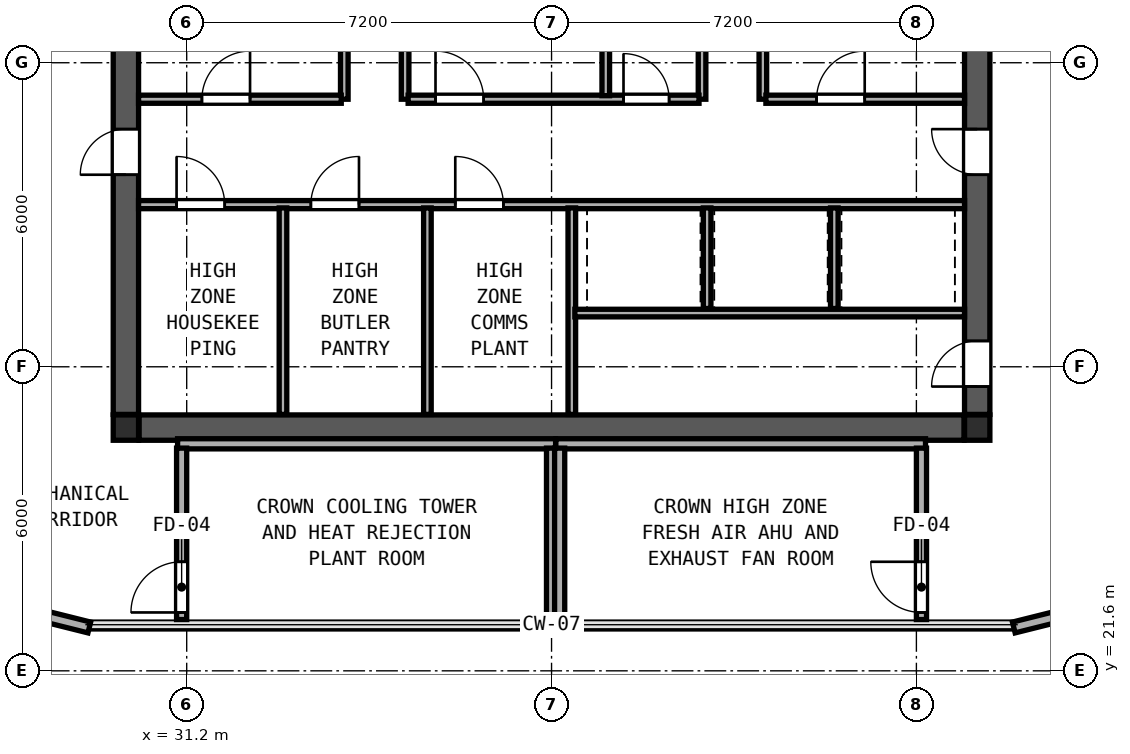
"""IFC4 building model, lengths in metres.
Left out: names, types, materials, properties, quantities, classifications, styles, units other than length and angle.
Written with IfcOpenShell. Run it as: python <this file> out.ifc"""

import sys

from ifc_helpers import new_model, si_unit, direction, frame, frame_2d, origin, origin_2d, place, context, subcontext, project, spatial, rectangle, hollow_rectangle, extrude, element, fill, save


model = new_model("IFC4")
c1 = context("Model", 3, precision=1e-05, world=origin(), true_north=direction((0.0, 1.0)))
c2 = subcontext(c1, "Body", "Model", "MODEL_VIEW")
j1 = project(units=[si_unit("LENGTHUNIT", "METRE"), si_unit("PLANEANGLEUNIT", "RADIAN")], contexts=[c1])
p1 = place(None, origin())
s1 = spatial("IfcSite", under=j1, at=p1, CompositionType="ELEMENT")
p2 = place(p1, origin())
s2 = spatial("IfcBuilding", under=s1, at=p2, CompositionType="ELEMENT")
p3 = place(p2, frame((0.0, 0.0, 328.2)))
s3 = spatial("IfcBuildingStorey", under=s2, at=p3, CompositionType="ELEMENT", Elevation=328.2)
p4 = place(p3, frame((30.26, 26.4, 0.0), z_axis=(0.0, 0.0, 1.0), x_axis=(1.0, 0.0, 0.0)))
e1 = element("IfcWall", 1, at=p4, inside=s3, PredefinedType="SHEAR", context=c2, shape_type="SweptSolid", body=[
    extrude(rectangle(XDim=16.28, YDim=0.5, at=frame_2d((8.14, 0.0))), origin(), (0.0, 0.0, 1.0), 4.55),
])
p5 = place(p3, frame((30.0, 26.66, 0.0), z_axis=(0.0, 0.0, 1.0), x_axis=(0.0, 1.0, 0.0)))
e2 = element("IfcWall", 2, at=p5, inside=s3, PredefinedType="SHEAR", context=c2, shape_type="SweptSolid", body=[
    extrude(rectangle(XDim=16.28, YDim=0.5, at=frame_2d((8.14, 0.0))), origin(), (0.0, 0.0, 1.0), 4.55),
])
p6 = place(p5, frame((4.73, 0.0, 0.0)))
e3 = element("IfcOpeningElement", 3, at=p6, cuts=e2, PredefinedType="OPENING", context=c2, shape_type="SweptSolid", body=[
    extrude(rectangle(XDim=0.9, YDim=2.1, at=frame_2d((0.45, 1.05))), frame((0.0, 0.26, 0.0), z_axis=(0.0, -1.0, 0.0), x_axis=(1.0, 0.0, 0.0)), (0.0, 0.0, 1.0), 0.52),
])
p7 = place(p3, frame((46.8, 26.66, 0.0), z_axis=(0.0, 0.0, 1.0), x_axis=(0.0, 1.0, 0.0)))
e4 = element("IfcWall", 4, at=p7, inside=s3, PredefinedType="SHEAR", context=c2, shape_type="SweptSolid", body=[
    extrude(rectangle(XDim=16.28, YDim=0.5, at=frame_2d((8.14, 0.0))), origin(), (0.0, 0.0, 1.0), 4.55),
])
p8 = place(p7, frame((5.63, 0.0, 0.0), z_axis=(0.0, 0.0, 1.0), x_axis=(-1.0, 0.0, 0.0)))
e5 = element("IfcOpeningElement", 5, at=p8, cuts=e4, PredefinedType="OPENING", context=c2, shape_type="SweptSolid", body=[
    extrude(rectangle(XDim=0.9, YDim=2.1, at=frame_2d((0.45, 1.05))), frame((0.0, 0.26, 0.0), z_axis=(0.0, -1.0, 0.0), x_axis=(1.0, 0.0, 0.0)), (0.0, 0.0, 1.0), 0.52),
])
p9 = place(p7, frame((1.45, 0.0, 0.0), z_axis=(0.0, 0.0, 1.0), x_axis=(-1.0, 0.0, 0.0)))
e6 = element("IfcOpeningElement", 6, at=p9, cuts=e4, PredefinedType="OPENING", context=c2, shape_type="SweptSolid", body=[
    extrude(rectangle(XDim=0.9, YDim=2.1, at=frame_2d((0.45, 1.05))), frame((0.0, 0.26, 0.0), z_axis=(0.0, -1.0, 0.0), x_axis=(1.0, 0.0, 0.0)), (0.0, 0.0, 1.0), 0.52),
])
for number, where, z_axis, x_axis in (
    (7, (30.0, 26.4, 0.0), (0.0, 0.0, 1.0), (1.0, 0.0, 0.0)),
    (8, (46.8, 26.4, 0.0), (0.0, 0.0, 1.0), (1.0, 0.0, 0.0)),
):
    element("IfcColumn", number, at=place(p3, frame(where, z_axis=z_axis, x_axis=x_axis)), inside=s3, PredefinedType="COLUMN", context=c2, shape_type="SweptSolid", body=[
        extrude(hollow_rectangle(XDim=0.5, YDim=0.5, WallThickness=0.02, at=origin_2d()), origin(), (0.0, 0.0, 1.0), 4.8),
    ])
p10 = place(p3, frame((26.057, 23.261, 0.0), z_axis=(0.0, 0.0, 1.0), x_axis=(0.970138175099, -0.242552924566, 0.0)))
e9 = element("IfcWall", 9, at=p10, inside=s3, PredefinedType="SOLIDWALL", context=c2, shape_type="SweptSolid", body=[
    extrude(rectangle(XDim=3.321, YDim=0.22, at=frame_2d((1.66, 0.0))), origin(), (0.0, 0.0, 1.0), 4.55),
])
p11 = place(p3, frame((47.522, 22.455, 0.0), z_axis=(0.0, 0.0, 1.0), x_axis=(0.970134270788, 0.242568540093, 0.0)))
e10 = element("IfcWall", 10, at=p11, inside=s3, PredefinedType="SOLIDWALL", context=c2, shape_type="SweptSolid", body=[
    extrude(rectangle(XDim=3.49, YDim=0.22, at=frame_2d((1.745, 0.0))), origin(), (0.0, 0.0, 1.0), 4.55),
])
for number, where, z_axis, x_axis in (
    (11, (34.31, 32.88, 0.0), (0.0, 0.0, 1.0), (0.0, 1.0, 0.0)),
    (12, (35.51, 32.88, 0.0), (0.0, 0.0, 1.0), (0.0, 1.0, 0.0)),
    (13, (41.37, 32.88, 0.0), (0.0, 0.0, 1.0), (0.0, 1.0, 0.0)),
    (14, (42.57, 32.88, 0.0), (0.0, 0.0, 1.0), (0.0, 1.0, 0.0)),
):
    element("IfcWall", number, at=place(p3, frame(where, z_axis=z_axis, x_axis=x_axis)), inside=s3, PredefinedType="SOLIDWALL", context=c2, shape_type="SweptSolid", body=[
        extrude(rectangle(XDim=2.17, YDim=0.15, at=frame_2d((1.085, 0.0))), origin(), (0.0, 0.0, 1.0), 4.55),
    ])
p12 = place(p3, frame((30.25, 32.88, 0.0), z_axis=(0.0, 0.0, 1.0), x_axis=(1.0, 0.0, 0.0)))
e15 = element("IfcWall", 15, at=p12, inside=s3, PredefinedType="SOLIDWALL", context=c2, shape_type="SweptSolid", body=[
    extrude(rectangle(XDim=4.0, YDim=0.16, at=frame_2d((2.0, 0.0))), origin(), (0.0, 0.0, 1.0), 4.55),
])
p13 = place(p12, frame((2.2, 0.0, 0.0), z_axis=(0.0, 0.0, 1.0), x_axis=(-1.0, 0.0, 0.0)))
e16 = element("IfcOpeningElement", 16, at=p13, cuts=e15, PredefinedType="OPENING", context=c2, shape_type="SweptSolid", body=[
    extrude(rectangle(XDim=0.95, YDim=2.12, at=frame_2d((0.475, 1.06))), frame((0.0, 0.09, 0.0), z_axis=(0.0, -1.0, 0.0), x_axis=(1.0, 0.0, 0.0)), (0.0, 0.0, 1.0), 0.18),
])
p14 = place(p3, frame((35.57, 32.88, 0.0), z_axis=(0.0, 0.0, 1.0), x_axis=(1.0, 0.0, 0.0)))
e17 = element("IfcWall", 17, at=p14, inside=s3, PredefinedType="SOLIDWALL", context=c2, shape_type="SweptSolid", body=[
    extrude(rectangle(XDim=5.74, YDim=0.16, at=frame_2d((2.87, 0.0))), origin(), (0.0, 0.0, 1.0), 4.55),
])
p15 = place(p14, frame((1.49, 0.0, 0.0), z_axis=(0.0, 0.0, 1.0), x_axis=(-1.0, 0.0, 0.0)))
e18 = element("IfcOpeningElement", 18, at=p15, cuts=e17, PredefinedType="OPENING", context=c2, shape_type="SweptSolid", body=[
    extrude(rectangle(XDim=0.95, YDim=2.12, at=frame_2d((0.475, 1.06))), frame((0.0, 0.09, 0.0), z_axis=(0.0, -1.0, 0.0), x_axis=(1.0, 0.0, 0.0)), (0.0, 0.0, 1.0), 0.18),
])
p16 = place(p14, frame((5.15, 0.0, 0.0), z_axis=(0.0, 0.0, 1.0), x_axis=(-1.0, 0.0, 0.0)))
e19 = element("IfcOpeningElement", 19, at=p16, cuts=e17, PredefinedType="OPENING", context=c2, shape_type="SweptSolid", body=[
    extrude(rectangle(XDim=0.9, YDim=2.1, at=frame_2d((0.45, 1.05))), frame((0.0, 0.09, 0.0), z_axis=(0.0, -1.0, 0.0), x_axis=(1.0, 0.0, 0.0)), (0.0, 0.0, 1.0), 0.18),
])
p17 = place(p3, frame((42.63, 32.88, 0.0), z_axis=(0.0, 0.0, 1.0), x_axis=(1.0, 0.0, 0.0)))
e20 = element("IfcWall", 20, at=p17, inside=s3, PredefinedType="SOLIDWALL", context=c2, shape_type="SweptSolid", body=[
    extrude(rectangle(XDim=3.92, YDim=0.16, at=frame_2d((1.96, 0.0))), origin(), (0.0, 0.0, 1.0), 4.55),
])
p18 = place(p17, frame((1.95, 0.0, 0.0), z_axis=(0.0, 0.0, 1.0), x_axis=(-1.0, 0.0, 0.0)))
e21 = element("IfcOpeningElement", 21, at=p18, cuts=e20, PredefinedType="OPENING", context=c2, shape_type="SweptSolid", body=[
    extrude(rectangle(XDim=0.95, YDim=2.12, at=frame_2d((0.475, 1.06))), frame((0.0, 0.09, 0.0), z_axis=(0.0, -1.0, 0.0), x_axis=(1.0, 0.0, 0.0)), (0.0, 0.0, 1.0), 0.18),
])
p19 = place(p3, frame((39.47, 32.95, 0.0), z_axis=(0.0, 0.0, 1.0), x_axis=(0.0, 1.0, 0.0)))
e22 = element("IfcWall", 22, at=p19, inside=s3, PredefinedType="SOLIDWALL", context=c2, shape_type="SweptSolid", body=[
    extrude(rectangle(XDim=2.05, YDim=0.15, at=frame_2d((1.025, 0.0))), origin(), (0.0, 0.0, 1.0), 4.55),
])
p20 = place(p3, frame((30.25, 30.8, 0.0), z_axis=(0.0, 0.0, 1.0), x_axis=(1.0, 0.0, 0.0)))
e23 = element("IfcWall", 23, at=p20, inside=s3, PredefinedType="SOLIDWALL", context=c2, shape_type="SweptSolid", body=[
    extrude(rectangle(XDim=16.3, YDim=0.16, at=frame_2d((8.15, 0.0))), origin(), (0.0, 0.0, 1.0), 4.55),
])
p21 = place(p20, frame((0.75, 0.0, 0.0)))
e24 = element("IfcOpeningElement", 24, at=p21, cuts=e23, PredefinedType="OPENING", context=c2, shape_type="SweptSolid", body=[
    extrude(rectangle(XDim=0.95, YDim=2.12, at=frame_2d((0.475, 1.06))), frame((0.0, 0.09, 0.0), z_axis=(0.0, -1.0, 0.0), x_axis=(1.0, 0.0, 0.0)), (0.0, 0.0, 1.0), 0.18),
])
p22 = place(p20, frame((3.4, 0.0, 0.0)))
e25 = element("IfcOpeningElement", 25, at=p22, cuts=e23, PredefinedType="OPENING", context=c2, shape_type="SweptSolid", body=[
    extrude(rectangle(XDim=0.95, YDim=2.12, at=frame_2d((0.475, 1.06))), frame((0.0, 0.09, 0.0), z_axis=(0.0, -1.0, 0.0), x_axis=(1.0, 0.0, 0.0)), (0.0, 0.0, 1.0), 0.18),
])
p23 = place(p20, frame((6.25, 0.0, 0.0)))
e26 = element("IfcOpeningElement", 26, at=p23, cuts=e23, PredefinedType="OPENING", context=c2, shape_type="SweptSolid", body=[
    extrude(rectangle(XDim=0.95, YDim=2.12, at=frame_2d((0.475, 1.06))), frame((0.0, 0.09, 0.0), z_axis=(0.0, -1.0, 0.0), x_axis=(1.0, 0.0, 0.0)), (0.0, 0.0, 1.0), 0.18),
])
p24 = place(p3, frame((38.8, 26.66, 0.0), z_axis=(0.0, 0.0, 1.0), x_axis=(0.0, 1.0, 0.0)))
e27 = element("IfcWall", 27, at=p24, inside=s3, PredefinedType="SOLIDWALL", context=c2, shape_type="SweptSolid", body=[
    extrude(rectangle(XDim=4.075, YDim=0.15, at=frame_2d((2.038, 0.0))), origin(), (0.0, 0.0, 1.0), 4.55),
])
for number, where, z_axis, x_axis in (
    (28, (33.1, 26.66, 0.0), (0.0, 0.0, 1.0), (0.0, 1.0, 0.0)),
    (29, (35.95, 26.66, 0.0), (0.0, 0.0, 1.0), (0.0, 1.0, 0.0)),
):
    element("IfcWall", number, at=place(p3, frame(where, z_axis=z_axis, x_axis=x_axis)), inside=s3, PredefinedType="PARTITIONING", context=c2, shape_type="SweptSolid", body=[
        extrude(rectangle(XDim=4.075, YDim=0.15, at=frame_2d((2.038, 0.0))), origin(), (0.0, 0.0, 1.0), 4.55),
    ])
p25 = place(p3, frame((38.86, 28.66, 0.0), z_axis=(0.0, 0.0, 1.0), x_axis=(1.0, 0.0, 0.0)))
e30 = element("IfcWall", 30, at=p25, inside=s3, PredefinedType="PARTITIONING", context=c2, shape_type="SweptSolid", body=[
    extrude(rectangle(XDim=7.69, YDim=0.15, at=frame_2d((3.845, 0.0))), origin(), (0.0, 0.0, 1.0), 4.55),
])
for number, where, z_axis, x_axis in (
    (31, (41.47, 28.75, 0.0), (0.0, 0.0, 1.0), (0.0, 1.0, 0.0)),
    (32, (43.98, 28.75, 0.0), (0.0, 0.0, 1.0), (0.0, 1.0, 0.0)),
):
    element("IfcWall", number, at=place(p3, frame(where, z_axis=z_axis, x_axis=x_axis)), inside=s3, PredefinedType="SOLIDWALL", context=c2, shape_type="SweptSolid", body=[
        extrude(rectangle(XDim=1.985, YDim=0.15, at=frame_2d((0.993, 0.0))), origin(), (0.0, 0.0, 1.0), 4.55),
    ])
p26 = place(p3, frame((31.02, 26.08, 0.0), z_axis=(0.0, 0.0, 1.0), x_axis=(1.0, 0.0, 0.0)))
e33 = element("IfcWall", 33, at=p26, inside=s3, PredefinedType="SOLIDWALL", context=c2, shape_type="SweptSolid", body=[
    extrude(rectangle(XDim=7.46, YDim=0.2, at=frame_2d((3.73, 0.0))), origin(), (0.0, 0.0, 1.0), 4.55),
])
p27 = place(p3, frame((31.1, 22.612, 0.0), z_axis=(0.0, 0.0, 1.0), x_axis=(0.0, 1.0, 0.0)))
e34 = element("IfcWall", 34, at=p27, inside=s3, PredefinedType="SOLIDWALL", context=c2, shape_type="SweptSolid", body=[
    extrude(rectangle(XDim=3.383, YDim=0.2, at=frame_2d((1.691, 0.0))), origin(), (0.0, 0.0, 1.0), 4.55),
])
p28 = place(p27, frame((0.14, 0.0, 0.0)))
e35 = element("IfcOpeningElement", 35, at=p28, cuts=e34, PredefinedType="OPENING", context=c2, shape_type="SweptSolid", body=[
    extrude(rectangle(XDim=1.0, YDim=2.1, at=frame_2d((0.5, 1.05))), frame((0.0, 0.11, 0.0), z_axis=(0.0, -1.0, 0.0), x_axis=(1.0, 0.0, 0.0)), (0.0, 0.0, 1.0), 0.22),
])
p29 = place(p3, frame((38.4, 22.612, 0.0), z_axis=(0.0, 0.0, 1.0), x_axis=(0.0, 1.0, 0.0)))
e36 = element("IfcWall", 36, at=p29, inside=s3, PredefinedType="SOLIDWALL", context=c2, shape_type="SweptSolid", body=[
    extrude(rectangle(XDim=3.383, YDim=0.2, at=frame_2d((1.691, 0.0))), origin(), (0.0, 0.0, 1.0), 4.55),
])
p30 = place(p3, frame((38.485, 26.08, 0.0), z_axis=(0.0, 0.0, 1.0), x_axis=(1.0, 0.0, 0.0)))
e37 = element("IfcWall", 37, at=p30, inside=s3, PredefinedType="SOLIDWALL", context=c2, shape_type="SweptSolid", body=[
    extrude(rectangle(XDim=7.295, YDim=0.2, at=frame_2d((3.647, 0.0))), origin(), (0.0, 0.0, 1.0), 4.55),
])
p31 = place(p3, frame((38.56, 22.612, 0.0), z_axis=(0.0, 0.0, 1.0), x_axis=(0.0, 1.0, 0.0)))
e38 = element("IfcWall", 38, at=p31, inside=s3, PredefinedType="SOLIDWALL", context=c2, shape_type="SweptSolid", body=[
    extrude(rectangle(XDim=3.383, YDim=0.2, at=frame_2d((1.691, 0.0))), origin(), (0.0, 0.0, 1.0), 4.55),
])
p32 = place(p3, frame((45.7, 22.612, 0.0), z_axis=(0.0, 0.0, 1.0), x_axis=(0.0, 1.0, 0.0)))
e39 = element("IfcWall", 39, at=p32, inside=s3, PredefinedType="SOLIDWALL", context=c2, shape_type="SweptSolid", body=[
    extrude(rectangle(XDim=3.383, YDim=0.2, at=frame_2d((1.691, 0.0))), origin(), (0.0, 0.0, 1.0), 4.55),
])
p33 = place(p32, frame((1.14, 0.0, 0.0), z_axis=(0.0, 0.0, 1.0), x_axis=(-1.0, 0.0, 0.0)))
e40 = element("IfcOpeningElement", 40, at=p33, cuts=e39, PredefinedType="OPENING", context=c2, shape_type="SweptSolid", body=[
    extrude(rectangle(XDim=1.0, YDim=2.1, at=frame_2d((0.5, 1.05))), frame((0.0, 0.11, 0.0), z_axis=(0.0, -1.0, 0.0), x_axis=(1.0, 0.0, 0.0)), (0.0, 0.0, 1.0), 0.22),
])
p34 = place(p6, origin())
e41 = element("IfcDoor", 41, at=p34, inside=s3, OperationType="SINGLE_SWING_LEFT", PredefinedType="DOOR", context=c2, shape_type="SweptSolid", body=[
    extrude(rectangle(XDim=0.9, YDim=2.1, at=frame_2d((0.45, 1.05))), frame((0.0, 0.025, 0.0), z_axis=(0.0, -1.0, 0.0), x_axis=(1.0, 0.0, 0.0)), (0.0, 0.0, 1.0), 0.05),
])
fill(e3, e41)
p35 = place(p8, origin())
e42 = element("IfcDoor", 42, at=p35, inside=s3, OperationType="SINGLE_SWING_LEFT", PredefinedType="DOOR", context=c2, shape_type="SweptSolid", body=[
    extrude(rectangle(XDim=0.9, YDim=2.1, at=frame_2d((0.45, 1.05))), frame((0.0, 0.025, 0.0), z_axis=(0.0, -1.0, 0.0), x_axis=(1.0, 0.0, 0.0)), (0.0, 0.0, 1.0), 0.05),
])
fill(e5, e42)
p36 = place(p13, origin())
e43 = element("IfcDoor", 43, at=p36, inside=s3, OperationType="SINGLE_SWING_LEFT", PredefinedType="DOOR", context=c2, shape_type="SweptSolid", body=[
    extrude(rectangle(XDim=0.95, YDim=2.12, at=frame_2d((0.475, 1.06))), frame((0.0, 0.025, 0.0), z_axis=(0.0, -1.0, 0.0), x_axis=(1.0, 0.0, 0.0)), (0.0, 0.0, 1.0), 0.05),
])
fill(e16, e43)
p37 = place(p15, origin())
e44 = element("IfcDoor", 44, at=p37, inside=s3, OperationType="SINGLE_SWING_RIGHT", PredefinedType="DOOR", context=c2, shape_type="SweptSolid", body=[
    extrude(rectangle(XDim=0.95, YDim=2.12, at=frame_2d((0.475, 1.06))), frame((0.0, 0.025, 0.0), z_axis=(0.0, -1.0, 0.0), x_axis=(1.0, 0.0, 0.0)), (0.0, 0.0, 1.0), 0.05),
])
fill(e18, e44)
p38 = place(p16, origin())
e45 = element("IfcDoor", 45, at=p38, inside=s3, OperationType="SINGLE_SWING_RIGHT", PredefinedType="DOOR", context=c2, shape_type="SweptSolid", body=[
    extrude(rectangle(XDim=0.9, YDim=2.1, at=frame_2d((0.45, 1.05))), frame((0.0, 0.025, 0.0), z_axis=(0.0, -1.0, 0.0), x_axis=(1.0, 0.0, 0.0)), (0.0, 0.0, 1.0), 0.05),
])
fill(e19, e45)
p39 = place(p18, origin())
e46 = element("IfcDoor", 46, at=p39, inside=s3, OperationType="SINGLE_SWING_LEFT", PredefinedType="DOOR", context=c2, shape_type="SweptSolid", body=[
    extrude(rectangle(XDim=0.95, YDim=2.12, at=frame_2d((0.475, 1.06))), frame((0.0, 0.025, 0.0), z_axis=(0.0, -1.0, 0.0), x_axis=(1.0, 0.0, 0.0)), (0.0, 0.0, 1.0), 0.05),
])
fill(e21, e46)
p40 = place(p21, origin())
e47 = element("IfcDoor", 47, at=p40, inside=s3, OperationType="SINGLE_SWING_LEFT", PredefinedType="DOOR", context=c2, shape_type="SweptSolid", body=[
    extrude(rectangle(XDim=0.95, YDim=2.12, at=frame_2d((0.475, 1.06))), frame((0.0, 0.025, 0.0), z_axis=(0.0, -1.0, 0.0), x_axis=(1.0, 0.0, 0.0)), (0.0, 0.0, 1.0), 0.05),
])
fill(e24, e47)
p41 = place(p22, origin())
e48 = element("IfcDoor", 48, at=p41, inside=s3, OperationType="SINGLE_SWING_RIGHT", PredefinedType="DOOR", context=c2, shape_type="SweptSolid", body=[
    extrude(rectangle(XDim=0.95, YDim=2.12, at=frame_2d((0.475, 1.06))), frame((0.0, 0.025, 0.0), z_axis=(0.0, -1.0, 0.0), x_axis=(1.0, 0.0, 0.0)), (0.0, 0.0, 1.0), 0.05),
])
fill(e25, e48)
p42 = place(p23, origin())
e49 = element("IfcDoor", 49, at=p42, inside=s3, OperationType="SINGLE_SWING_LEFT", PredefinedType="DOOR", context=c2, shape_type="SweptSolid", body=[
    extrude(rectangle(XDim=0.95, YDim=2.12, at=frame_2d((0.475, 1.06))), frame((0.0, 0.025, 0.0), z_axis=(0.0, -1.0, 0.0), x_axis=(1.0, 0.0, 0.0)), (0.0, 0.0, 1.0), 0.05),
])
fill(e26, e49)
p43 = place(p9, origin())
e50 = element("IfcDoor", 50, at=p43, inside=s3, OperationType="SINGLE_SWING_RIGHT", PredefinedType="DOOR", context=c2, shape_type="SweptSolid", body=[
    extrude(rectangle(XDim=0.9, YDim=2.1, at=frame_2d((0.45, 1.05))), frame((0.0, -0.135, 0.0), z_axis=(0.0, -1.0, 0.0), x_axis=(1.0, 0.0, 0.0)), (0.0, 0.0, 1.0), 0.05),
])
fill(e6, e50)
p44 = place(p28, origin())
e51 = element("IfcDoor", 51, at=p44, inside=s3, OperationType="SINGLE_SWING_LEFT", PredefinedType="DOOR", context=c2, shape_type="SweptSolid", body=[
    extrude(rectangle(XDim=1.0, YDim=2.1, at=frame_2d((0.5, 1.05))), frame((0.0, 0.025, 0.0), z_axis=(0.0, -1.0, 0.0), x_axis=(1.0, 0.0, 0.0)), (0.0, 0.0, 1.0), 0.05),
])
fill(e35, e51)
p45 = place(p33, origin())
e52 = element("IfcDoor", 52, at=p45, inside=s3, OperationType="SINGLE_SWING_LEFT", PredefinedType="DOOR", context=c2, shape_type="SweptSolid", body=[
    extrude(rectangle(XDim=1.0, YDim=2.1, at=frame_2d((0.5, 1.05))), frame((0.0, 0.025, 0.0), z_axis=(0.0, -1.0, 0.0), x_axis=(1.0, 0.0, 0.0)), (0.0, 0.0, 1.0), 0.05),
])
fill(e40, e52)
save(model, sys.argv[1])
